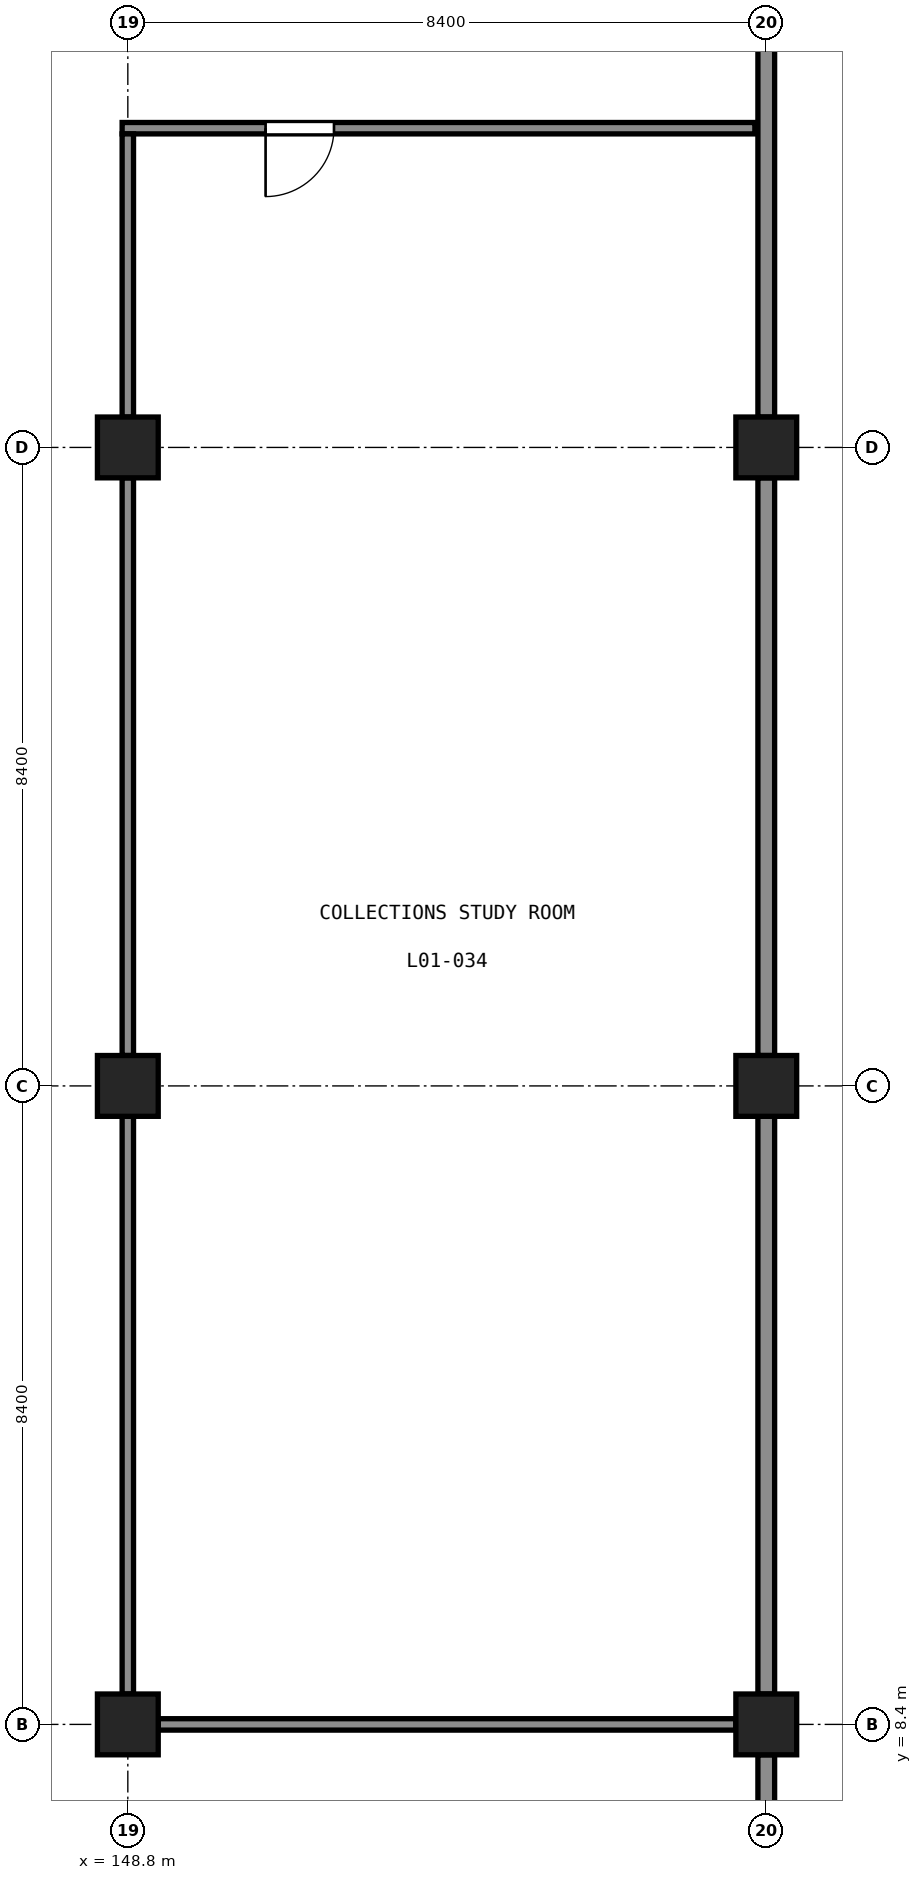
"""IFC4 building model, lengths in metres.
Left out: names, types, materials, properties, quantities, classifications, styles, units other than length and angle.
Written with IfcOpenShell. Run it as: python <this file> out.ifc"""

import sys

from ifc_helpers import new_model, si_unit, direction, frame, frame_2d, origin, origin_2d, place, context, subcontext, project, spatial, rectangle, extrude, element, fill, save


model = new_model("IFC4")
c1 = context("Model", 3, precision=1e-05, world=origin(), true_north=direction((0.0, 1.0)))
c2 = subcontext(c1, "Body", "Model", "MODEL_VIEW")
j1 = project(units=[si_unit("LENGTHUNIT", "METRE"), si_unit("PLANEANGLEUNIT", "RADIAN")], contexts=[c1])
p1 = place(None, origin())
s1 = spatial("IfcSite", under=j1, at=p1, CompositionType="ELEMENT")
p2 = place(p1, origin())
s2 = spatial("IfcBuilding", under=s1, at=p2, CompositionType="ELEMENT")
p3 = place(p2, frame((0.0, 0.0, 5.5)))
s3 = spatial("IfcBuildingStorey", under=s2, at=p3, CompositionType="ELEMENT", Elevation=5.5)
for number, where, z_axis, x_axis in (
    (1, (148.8, 8.4, 0.0), (0.0, 0.0, 1.0), (1.0, 0.0, 0.0)),
    (2, (148.8, 16.8, 0.0), (0.0, 0.0, 1.0), (1.0, 0.0, 0.0)),
    (3, (148.8, 25.2, 0.0), (0.0, 0.0, 1.0), (1.0, 0.0, 0.0)),
    (4, (157.2, 8.4, 0.0), (0.0, 0.0, 1.0), (1.0, 0.0, 0.0)),
    (5, (157.2, 16.8, 0.0), (0.0, 0.0, 1.0), (1.0, 0.0, 0.0)),
    (6, (157.2, 25.2, 0.0), (0.0, 0.0, 1.0), (1.0, 0.0, 0.0)),
):
    element("IfcColumn", number, at=place(p3, frame(where, z_axis=z_axis, x_axis=x_axis)), inside=s3, PredefinedType="COLUMN", context=c2, shape_type="SweptSolid", body=[
        extrude(rectangle(XDim=0.8, YDim=0.8, at=origin_2d()), origin(), (0.0, 0.0, 1.0), 5.0),
    ])
p4 = place(p3, frame((157.2, 0.4, 0.0), z_axis=(0.0, 0.0, 1.0), x_axis=(0.0, 1.0, 0.0)))
e7 = element("IfcWall", 7, at=p4, inside=s3, PredefinedType="SOLIDWALL", context=c2, shape_type="SweptSolid", body=[
    extrude(rectangle(XDim=7.6, YDim=0.22, at=frame_2d((3.8, 0.0))), origin(), (0.0, 0.0, 1.0), 3.94),
])
p5 = place(p3, frame((157.2, 8.8, 0.0), z_axis=(0.0, 0.0, 1.0), x_axis=(0.0, 1.0, 0.0)))
e8 = element("IfcWall", 8, at=p5, inside=s3, PredefinedType="SOLIDWALL", context=c2, shape_type="SweptSolid", body=[
    extrude(rectangle(XDim=7.6, YDim=0.22, at=frame_2d((3.8, 0.0))), origin(), (0.0, 0.0, 1.0), 3.94),
])
p6 = place(p3, frame((157.2, 17.2, 0.0), z_axis=(0.0, 0.0, 1.0), x_axis=(0.0, 1.0, 0.0)))
e9 = element("IfcWall", 9, at=p6, inside=s3, PredefinedType="SOLIDWALL", context=c2, shape_type="SweptSolid", body=[
    extrude(rectangle(XDim=7.6, YDim=0.22, at=frame_2d((3.8, 0.0))), origin(), (0.0, 0.0, 1.0), 3.94),
])
p7 = place(p3, frame((157.2, 25.6, 0.0), z_axis=(0.0, 0.0, 1.0), x_axis=(0.0, 1.0, 0.0)))
e10 = element("IfcWall", 10, at=p7, inside=s3, PredefinedType="SOLIDWALL", context=c2, shape_type="SweptSolid", body=[
    extrude(rectangle(XDim=8.0, YDim=0.22, at=frame_2d((4.0, 0.0))), origin(), (0.0, 0.0, 1.0), 3.94),
])
p8 = place(p3, frame((148.725, 29.4, 0.0), z_axis=(0.0, 0.0, 1.0), x_axis=(1.0, 0.0, 0.0)))
e11 = element("IfcWall", 11, at=p8, inside=s3, PredefinedType="PARTITIONING", context=c2, shape_type="SweptSolid", body=[
    extrude(rectangle(XDim=8.325, YDim=0.15, at=frame_2d((4.163, 0.0))), origin(), (0.0, 0.0, 1.0), 3.9),
])
p9 = place(p8, frame((1.887, 0.0, 0.0)))
e12 = element("IfcOpeningElement", 12, at=p9, cuts=e11, PredefinedType="OPENING", context=c2, shape_type="SweptSolid", body=[
    extrude(rectangle(XDim=0.9, YDim=2.1, at=frame_2d((0.45, 1.05))), frame((0.0, 0.085, 0.0), z_axis=(0.0, -1.0, 0.0), x_axis=(1.0, 0.0, 0.0)), (0.0, 0.0, 1.0), 0.17),
])
p10 = place(p3, frame((149.2, 8.4, 0.0), z_axis=(0.0, 0.0, 1.0), x_axis=(1.0, 0.0, 0.0)))
e13 = element("IfcWall", 13, at=p10, inside=s3, PredefinedType="PARTITIONING", context=c2, shape_type="SweptSolid", body=[
    extrude(rectangle(XDim=7.6, YDim=0.15, at=frame_2d((3.8, 0.0))), origin(), (0.0, 0.0, 1.0), 3.9),
])
p11 = place(p3, frame((148.8, 8.8, 0.0), z_axis=(0.0, 0.0, 1.0), x_axis=(0.0, 1.0, 0.0)))
e14 = element("IfcWall", 14, at=p11, inside=s3, PredefinedType="PARTITIONING", context=c2, shape_type="SweptSolid", body=[
    extrude(rectangle(XDim=7.6, YDim=0.15, at=frame_2d((3.8, 0.0))), origin(), (0.0, 0.0, 1.0), 3.9),
])
p12 = place(p3, frame((148.8, 17.2, 0.0), z_axis=(0.0, 0.0, 1.0), x_axis=(0.0, 1.0, 0.0)))
e15 = element("IfcWall", 15, at=p12, inside=s3, PredefinedType="PARTITIONING", context=c2, shape_type="SweptSolid", body=[
    extrude(rectangle(XDim=7.6, YDim=0.15, at=frame_2d((3.8, 0.0))), origin(), (0.0, 0.0, 1.0), 3.9),
])
p13 = place(p3, frame((148.8, 25.6, 0.0), z_axis=(0.0, 0.0, 1.0), x_axis=(0.0, 1.0, 0.0)))
e16 = element("IfcWall", 16, at=p13, inside=s3, PredefinedType="PARTITIONING", context=c2, shape_type="SweptSolid", body=[
    extrude(rectangle(XDim=3.725, YDim=0.15, at=frame_2d((1.862, 0.0))), origin(), (0.0, 0.0, 1.0), 3.9),
])
p14 = place(p9, origin())
e17 = element("IfcDoor", 17, at=p14, inside=s3, OperationType="SINGLE_SWING_LEFT", PredefinedType="DOOR", context=c2, shape_type="SweptSolid", body=[
    extrude(rectangle(XDim=0.9, YDim=2.1, at=frame_2d((0.45, 1.05))), frame((0.0, 0.025, 0.0), z_axis=(0.0, -1.0, 0.0), x_axis=(1.0, 0.0, 0.0)), (0.0, 0.0, 1.0), 0.05),
])
fill(e12, e17)
save(model, sys.argv[1])
